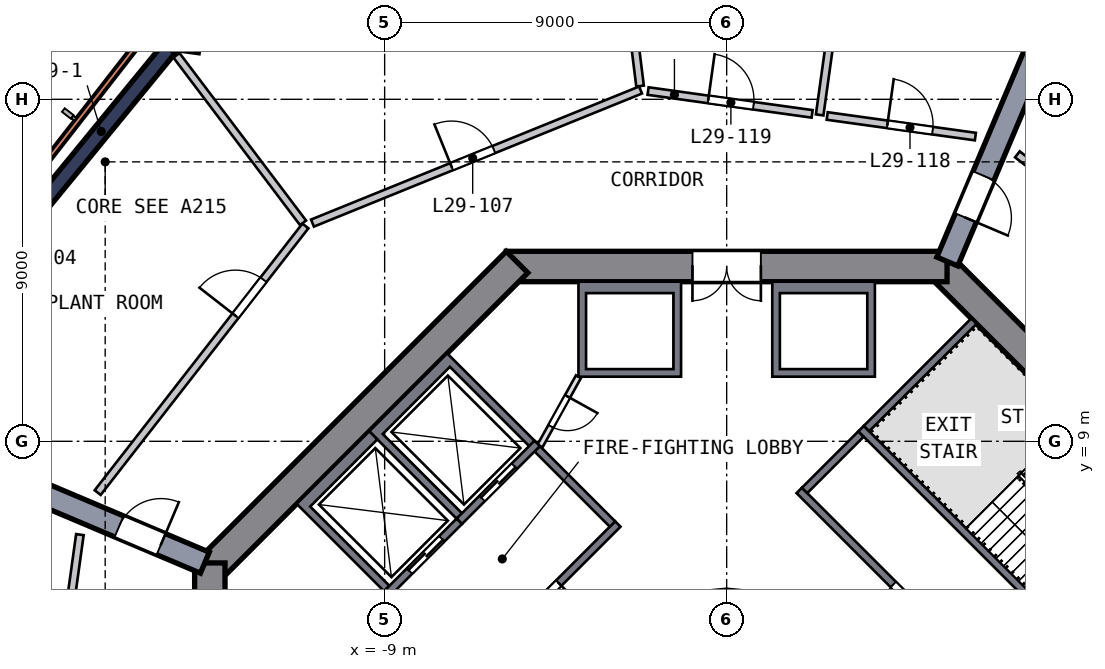
"""IFC4 building model, lengths in metres.
Left out: names, types, materials, properties, quantities, classifications, styles, units other than length and angle.
Written with IfcOpenShell. Run it as: python <this file> out.ifc"""

import sys

from ifc_helpers import new_model, si_unit, direction, frame, frame_2d, origin, origin_2d, place, context, subcontext, project, spatial, polyline, rectangle, outline, extrude, element, fill, save


model = new_model("IFC4")
c1 = context("Model", 3, precision=1e-05, world=origin(), true_north=direction((0.0, 1.0)))
c2 = subcontext(c1, "Body", "Model", "MODEL_VIEW")
j1 = project(units=[si_unit("LENGTHUNIT", "METRE"), si_unit("PLANEANGLEUNIT", "RADIAN")], contexts=[c1])
p1 = place(None, origin())
s1 = spatial("IfcSite", under=j1, at=p1, CompositionType="ELEMENT")
p2 = place(p1, origin())
s2 = spatial("IfcBuilding", under=s1, at=p2, CompositionType="ELEMENT")
p3 = place(p2, frame((0.0, 0.0, 122.0)))
s3 = spatial("IfcBuildingStorey", under=s2, at=p3, CompositionType="ELEMENT", Elevation=122.0)
p4 = place(p3, frame((-14.204, 19.906, 0.0), z_axis=(-0.0551557, -0.040054188, 0.99767405), x_axis=(0.135402045, 0.989664955, 0.047218248)))
e1 = element("IfcColumn", 1, at=p4, inside=s3, PredefinedType="COLUMN", context=c2, shape_type="SweptSolid", body=[
    extrude(rectangle(XDim=1.15, YDim=0.9, at=origin_2d()), origin(), (0.0, 0.0, 1.0), 4.51),
])
p5 = place(p3, frame((13.717, 5.516, 0.0), z_axis=(0.0, 0.0, 1.0), x_axis=(-0.707106781, 0.707106781, 0.0)))
e2 = element("IfcWall", 2, at=p5, inside=s3, PredefinedType="SHEAR", context=c2, shape_type="SweptSolid", body=[
    extrude(rectangle(XDim=11.598, YDim=0.8, at=frame_2d((5.799, 0.0))), origin(), (0.0, 0.0, 1.0), 6.0),
])
p6 = place(p5, frame((2.099, 0.0, 0.0)))
e3 = element("IfcOpeningElement", 3, at=p6, cuts=e2, PredefinedType="OPENING", context=c2, shape_type="SweptSolid", body=[
    extrude(rectangle(XDim=1.2, YDim=2.1, at=frame_2d((0.6, 1.05))), frame((0.0, 0.41, 0.0), z_axis=(0.0, -1.0, 0.0), x_axis=(1.0, 0.0, 0.0)), (0.0, 0.0, 1.0), 0.82),
])
p7 = place(p3, frame((5.799, 13.6, 0.0), z_axis=(0.0, 0.0, 1.0), x_axis=(-1.0, 0.0, 0.0)))
e4 = element("IfcWall", 4, at=p7, inside=s3, PredefinedType="SHEAR", context=c2, shape_type="SweptSolid", body=[
    extrude(rectangle(XDim=11.598, YDim=0.8, at=frame_2d((5.799, 0.0))), origin(), (0.0, 0.0, 1.0), 6.0),
])
p8 = place(p7, frame((4.899, 0.0, 0.0)))
e5 = element("IfcOpeningElement", 5, at=p8, cuts=e4, PredefinedType="OPENING", context=c2, shape_type="SweptSolid", body=[
    extrude(rectangle(XDim=1.8, YDim=2.1, at=frame_2d((0.9, 1.05))), frame((0.0, 0.41, 0.0), z_axis=(0.0, -1.0, 0.0), x_axis=(1.0, 0.0, 0.0)), (0.0, 0.0, 1.0), 0.82),
])
p9 = place(p3, frame((-5.516, 13.717, 0.0), z_axis=(0.0, 0.0, 1.0), x_axis=(-0.707106781, -0.707106781, 0.0)))
e6 = element("IfcWall", 6, at=p9, inside=s3, PredefinedType="SHEAR", context=c2, shape_type="SweptSolid", body=[
    extrude(rectangle(XDim=11.598, YDim=0.8, at=frame_2d((5.799, 0.0))), origin(), (0.0, 0.0, 1.0), 6.0),
])
p10 = place(p3, frame((-13.6, 5.799, 0.0), z_axis=(0.0, 0.0, 1.0), x_axis=(0.0, -1.0, 0.0)))
e7 = element("IfcWall", 7, at=p10, inside=s3, PredefinedType="SHEAR", context=c2, shape_type="SweptSolid", body=[
    extrude(rectangle(XDim=11.598, YDim=0.8, at=frame_2d((5.799, 0.0))), origin(), (0.0, 0.0, 1.0), 6.0),
])
p11 = place(p10, frame((4.899, 0.0, 0.0)))
e8 = element("IfcOpeningElement", 8, at=p11, cuts=e7, PredefinedType="OPENING", context=c2, shape_type="SweptSolid", body=[
    extrude(rectangle(XDim=1.8, YDim=2.1, at=frame_2d((0.9, 1.05))), frame((0.0, 0.41, 0.0), z_axis=(0.0, -1.0, 0.0), x_axis=(1.0, 0.0, 0.0)), (0.0, 0.0, 1.0), 0.82),
])
p12 = place(p3, frame((-14.664, 19.344, 0.0), z_axis=(0.0, 0.0, 1.0), x_axis=(-0.63358979, -0.773669166, 0.0)))
e9 = element("IfcWall", 9, at=p12, inside=s3, PredefinedType="SHEAR", context=c2, shape_type="SweptSolid", body=[
    extrude(rectangle(XDim=5.664, YDim=0.4, at=frame_2d((2.832, 0.0))), origin(), (0.0, 0.0, 1.0), 4.5),
])
p13 = place(p3, frame((-13.731, 5.806, 0.0), z_axis=(0.0, 0.0, 1.0), x_axis=(-0.921048088, 0.389448866, 0.0)))
e10 = element("IfcWall", 10, at=p13, inside=s3, PredefinedType="SHEAR", context=c2, shape_type="SweptSolid", body=[
    extrude(rectangle(XDim=8.835, YDim=0.6, at=frame_2d((4.417, 0.0))), origin(), (0.0, 0.0, 1.0), 4.5),
])
p14 = place(p13, frame((1.25, 0.0, 0.0)))
e11 = element("IfcOpeningElement", 11, at=p14, cuts=e10, PredefinedType="OPENING", context=c2, shape_type="SweptSolid", body=[
    extrude(rectangle(XDim=1.2, YDim=2.1, at=frame_2d((0.6, 1.05))), frame((0.0, 0.31, 0.0), z_axis=(0.0, -1.0, 0.0), x_axis=(1.0, 0.0, 0.0)), (0.0, 0.0, 1.0), 0.62),
])
p15 = place(p3, frame((5.806, 13.731, 0.0), z_axis=(0.0, 0.0, 1.0), x_axis=(0.389448866, 0.921048088, 0.0)))
e12 = element("IfcWall", 12, at=p15, inside=s3, PredefinedType="SHEAR", context=c2, shape_type="SweptSolid", body=[
    extrude(rectangle(XDim=8.835, YDim=0.6, at=frame_2d((4.417, 0.0))), origin(), (0.0, 0.0, 1.0), 4.5),
])
p16 = place(p15, frame((1.25, 0.0, 0.0)))
e13 = element("IfcOpeningElement", 13, at=p16, cuts=e12, PredefinedType="OPENING", context=c2, shape_type="SweptSolid", body=[
    extrude(rectangle(XDim=1.2, YDim=2.1, at=frame_2d((0.6, 1.05))), frame((0.0, 0.31, 0.0), z_axis=(0.0, -1.0, 0.0), x_axis=(1.0, 0.0, 0.0)), (0.0, 0.0, 1.0), 0.62),
])
p17 = place(p3, frame((-15.076, 19.999, 0.0), z_axis=(0.0, 0.0, 1.0), x_axis=(-0.614558391, -0.788871336, 0.0)))
e14 = element("IfcWall", 14, at=p17, inside=s3, PredefinedType="SOLIDWALL", context=c2, shape_type="SweptSolid", body=[
    extrude(rectangle(XDim=13.046, YDim=0.15, at=frame_2d((6.523, 0.0))), origin(), (0.0, 0.0, 1.0), 4.5),
])
p18 = place(p3, origin())
e15 = element("IfcWall", 15, at=p18, inside=s3, PredefinedType="SOLIDWALL", context=c2, shape_type="SweptSolid", body=[
    extrude(outline(polyline([(1.2, 13.2), (3.9, 13.2), (3.9, 10.7), (1.2, 10.7), (1.2, 13.2)]), holes=[polyline([(3.7, 10.9), (3.7, 12.9), (1.4, 12.9), (1.4, 10.9), (3.7, 10.9)])]), origin(), (0.0, 0.0, 1.0), 5.55),
])
p19 = place(p3, origin())
e16 = element("IfcWall", 16, at=p19, inside=s3, PredefinedType="SOLIDWALL", context=c2, shape_type="SweptSolid", body=[
    extrude(outline(polyline([(-3.9, 10.7), (-3.9, 13.2), (-1.2, 13.2), (-1.2, 10.7), (-3.9, 10.7)]), holes=[polyline([(-1.4, 12.9), (-3.7, 12.9), (-3.7, 10.9), (-1.4, 10.9), (-1.4, 12.9)])]), origin(), (0.0, 0.0, 1.0), 5.55),
])
p20 = place(p3, origin())
e17 = element("IfcWall", 17, at=p20, inside=s3, PredefinedType="SOLIDWALL", context=c2, shape_type="SweptSolid", body=[
    extrude(outline(polyline([(-9.405, 9.263), (-7.354, 11.314), (-5.056, 9.016), (-5.197, 8.874), (-7.283, 10.96), (-9.051, 9.192), (-6.965, 7.106), (-7.106, 6.965), (-9.405, 9.263)])), origin(), (0.0, 0.0, 1.0), 5.55),
])
p21 = place(p3, frame((-4.985, 8.945, 0.0), z_axis=(0.0, 0.0, 1.0), x_axis=(-0.707106781, -0.707106781, 0.0)))
e18 = element("IfcWall", 18, at=p21, inside=s3, PredefinedType="SOLIDWALL", context=c2, shape_type="SweptSolid", body=[
    extrude(rectangle(XDim=2.9, YDim=0.2, at=frame_2d((1.45, 0.0))), origin(), (0.0, 0.0, 1.0), 5.55),
])
p22 = place(p21, frame((0.85, 0.0, 0.0)))
e19 = element("IfcOpeningElement", 19, at=p22, cuts=e18, PredefinedType="OPENING", context=c2, shape_type="SweptSolid", body=[
    extrude(rectangle(XDim=1.2, YDim=2.1, at=frame_2d((0.6, 1.05))), frame((0.0, 0.11, 0.0), z_axis=(0.0, -1.0, 0.0), x_axis=(1.0, 0.0, 0.0)), (0.0, 0.0, 1.0), 0.22),
])
p23 = place(p3, origin())
e20 = element("IfcWall", 20, at=p23, inside=s3, PredefinedType="SOLIDWALL", context=c2, shape_type="SweptSolid", body=[
    extrude(outline(polyline([(-11.314, 7.354), (-9.405, 9.263), (-9.192, 9.051), (-10.96, 7.283), (-8.874, 5.197), (-9.016, 5.056), (-11.314, 7.354)])), origin(), (0.0, 0.0, 1.0), 5.55),
])
p24 = place(p3, frame((-7.036, 6.894, 0.0), z_axis=(0.0, 0.0, 1.0), x_axis=(-0.707106781, -0.707106781, 0.0)))
e21 = element("IfcWall", 21, at=p24, inside=s3, PredefinedType="SOLIDWALL", context=c2, shape_type="SweptSolid", body=[
    extrude(rectangle(XDim=2.7, YDim=0.2, at=frame_2d((1.35, 0.0))), origin(), (0.0, 0.0, 1.0), 5.55),
])
p25 = place(p24, frame((0.65, 0.0, 0.0)))
e22 = element("IfcOpeningElement", 22, at=p25, cuts=e21, PredefinedType="OPENING", context=c2, shape_type="SweptSolid", body=[
    extrude(rectangle(XDim=1.2, YDim=2.1, at=frame_2d((0.6, 1.05))), frame((0.0, 0.11, 0.0), z_axis=(0.0, -1.0, 0.0), x_axis=(1.0, 0.0, 0.0)), (0.0, 0.0, 1.0), 0.22),
])
p26 = place(p3, frame((3.535, 9.334, 0.0), z_axis=(0.0, 0.0, 1.0), x_axis=(0.707106781, -0.707106781, 0.0)))
e23 = element("IfcWall", 23, at=p26, inside=s3, PredefinedType="SOLIDWALL", context=c2, shape_type="SweptSolid", body=[
    extrude(rectangle(XDim=8.2, YDim=0.2, at=frame_2d((4.1, 0.0))), origin(), (0.0, 0.0, 1.0), 5.55),
])
p27 = place(p26, frame((6.6, 0.0, 0.0)))
e24 = element("IfcOpeningElement", 24, at=p27, cuts=e23, PredefinedType="OPENING", context=c2, shape_type="SweptSolid", body=[
    extrude(rectangle(XDim=1.2, YDim=2.1, at=frame_2d((0.6, 1.05))), frame((0.0, 0.11, 0.0), z_axis=(0.0, -1.0, 0.0), x_axis=(1.0, 0.0, 0.0)), (0.0, 0.0, 1.0), 0.22),
])
p28 = place(p3, frame((3.677, 9.334, 0.0), z_axis=(0.0, 0.0, 1.0), x_axis=(0.707106781, 0.707106781, 0.0)))
e25 = element("IfcWall", 25, at=p28, inside=s3, PredefinedType="SOLIDWALL", context=c2, shape_type="SweptSolid", body=[
    extrude(rectangle(XDim=4.0, YDim=0.2, at=frame_2d((2.0, 0.0))), origin(), (0.0, 0.0, 1.0), 5.55),
])
p29 = place(p3, frame((-2.864, 6.823, 0.0), z_axis=(0.0, 0.0, 1.0), x_axis=(-0.707106781, -0.707106781, 0.0)))
e26 = element("IfcWall", 26, at=p29, inside=s3, PredefinedType="SOLIDWALL", context=c2, shape_type="SweptSolid", body=[
    extrude(rectangle(XDim=5.6, YDim=0.2, at=frame_2d((2.8, 0.0))), origin(), (0.0, 0.0, 1.0), 5.55),
])
p30 = place(p29, frame((2.2, 0.0, 0.0)))
e27 = element("IfcOpeningElement", 27, at=p30, cuts=e26, PredefinedType="OPENING", context=c2, shape_type="SweptSolid", body=[
    extrude(rectangle(XDim=1.2, YDim=2.1, at=frame_2d((0.6, 1.05))), frame((0.0, 0.11, 0.0), z_axis=(0.0, -1.0, 0.0), x_axis=(1.0, 0.0, 0.0)), (0.0, 0.0, 1.0), 0.22),
])
p31 = place(p3, frame((-3.005, 6.823, 0.0), z_axis=(0.0, 0.0, 1.0), x_axis=(-0.707106781, 0.707106781, 0.0)))
e28 = element("IfcWall", 28, at=p31, inside=s3, PredefinedType="SOLIDWALL", context=c2, shape_type="SweptSolid", body=[
    extrude(rectangle(XDim=2.8, YDim=0.2, at=frame_2d((1.4, 0.0))), origin(), (0.0, 0.0, 1.0), 5.55),
])
p32 = place(p3, frame((-3.9, 10.7, 0.0), z_axis=(0.0, 0.0, 1.0), x_axis=(-0.485692555, -0.874129705, 0.0)))
e29 = element("IfcWall", 29, at=p32, inside=s3, PredefinedType="PARTITIONING", context=c2, shape_type="SweptSolid", body=[
    extrude(rectangle(XDim=2.089, YDim=0.15, at=frame_2d((1.044, 0.0))), origin(), (0.0, 0.0, 1.0), 5.55),
])
p33 = place(p32, frame((0.594, 0.0, 0.0)))
e30 = element("IfcOpeningElement", 30, at=p33, cuts=e29, PredefinedType="OPENING", context=c2, shape_type="SweptSolid", body=[
    extrude(rectangle(XDim=0.9, YDim=2.1, at=frame_2d((0.45, 1.05))), frame((0.0, 0.085, 0.0), z_axis=(0.0, -1.0, 0.0), x_axis=(1.0, 0.0, 0.0)), (0.0, 0.0, 1.0), 0.17),
])
p34 = place(p3, frame((7.708, 1.909, 0.0), z_axis=(0.0, 0.0, 1.0), x_axis=(-0.707106781, 0.707106781, 0.0)))
e31 = element("IfcWall", 31, at=p34, inside=s3, PredefinedType="SOLIDWALL", context=c2, shape_type="SweptSolid", body=[
    extrude(rectangle(XDim=8.2, YDim=0.2, at=frame_2d((4.1, 0.0))), origin(), (0.0, 0.0, 1.0), 5.55),
])
p35 = place(p34, frame((3.5, 0.0, 0.0)))
e32 = element("IfcOpeningElement", 32, at=p35, cuts=e31, PredefinedType="OPENING", context=c2, shape_type="SweptSolid", body=[
    extrude(rectangle(XDim=1.2, YDim=2.1, at=frame_2d((0.6, 1.05))), frame((0.0, 0.11, 0.0), z_axis=(0.0, -1.0, 0.0), x_axis=(1.0, 0.0, 0.0)), (0.0, 0.0, 1.0), 0.22),
])
p36 = place(p3, frame((2.051, 7.708, 0.0), z_axis=(0.0, 0.0, 1.0), x_axis=(0.707106781, 0.707106781, 0.0)))
e33 = element("IfcWall", 33, at=p36, inside=s3, PredefinedType="SOLIDWALL", context=c2, shape_type="SweptSolid", body=[
    extrude(rectangle(XDim=2.1, YDim=0.2, at=frame_2d((1.05, 0.0))), origin(), (0.0, 0.0, 1.0), 5.55),
])
p37 = place(p3, origin())
e34 = element("IfcWall", 34, at=p37, inside=s3, PredefinedType="SOLIDWALL", context=c2, shape_type="SweptSolid", body=[
    extrude(outline(polyline([(5.021, -0.999), (4.73, -1.959), (4.257, -2.844), (3.62, -3.62), (2.844, -4.257), (1.959, -4.73), (0.999, -5.021), (0.0, -5.12), (-0.999, -5.021), (-1.959, -4.73), (-2.844, -4.257), (-3.62, -3.62), (-4.257, -2.844), (-4.73, -1.959), (-5.021, -0.999), (-5.12, 0.0), (-5.021, 0.999), (-4.73, 1.959), (-4.257, 2.844), (-3.62, 3.62), (-2.844, 4.257), (-1.959, 4.73), (-0.999, 5.021), (0.0, 5.12), (0.999, 5.021), (1.959, 4.73), (2.844, 4.257), (3.62, 3.62), (4.257, 2.844), (4.73, 1.959), (5.021, 0.999), (5.12, 0.0), (5.021, -0.999)]), holes=[polyline([(4.904, 0.976), (4.619, 1.913), (4.157, 2.778), (3.535, 3.535), (2.778, 4.157), (1.913, 4.619), (0.976, 4.904), (0.0, 5.0), (-0.976, 4.904), (-1.913, 4.619), (-2.778, 4.157), (-3.535, 3.535), (-4.157, 2.778), (-4.619, 1.913), (-4.904, 0.976), (-5.0, 0.0), (-4.904, -0.976), (-4.619, -1.913), (-4.157, -2.778), (-3.535, -3.535), (-2.778, -4.157), (-1.913, -4.619), (-0.976, -4.904), (0.0, -5.0), (0.976, -4.904), (1.913, -4.619), (2.778, -4.157), (3.535, -3.535), (4.157, -2.778), (4.619, -1.913), (4.904, -0.976), (5.0, 0.0), (4.904, 0.976)])]), origin(), (0.0, 0.0, 1.0), 5.55),
])
p38 = place(p3, frame((-17.019, 6.544, 0.0), z_axis=(0.0, 0.0, 1.0), x_axis=(-0.137739068, -0.99046855, 0.0)))
e35 = element("IfcWall", 35, at=p38, inside=s3, PredefinedType="SOLIDWALL", context=c2, shape_type="SweptSolid", body=[
    extrude(rectangle(XDim=3.937, YDim=0.2, at=frame_2d((1.968, 0.0))), origin(), (0.0, 0.0, 1.0), 4.5),
])
p39 = place(p3, frame((-16.551, 7.65, 0.0), z_axis=(0.0, 0.0, 1.0), x_axis=(0.614571282, 0.788861293, 0.0)))
e36 = element("IfcWall", 36, at=p39, inside=s3, PredefinedType="SOLIDWALL", context=c2, shape_type="SweptSolid", body=[
    extrude(rectangle(XDim=8.895, YDim=0.2, at=frame_2d((4.448, 0.0))), origin(), (0.0, 0.0, 1.0), 4.5),
])
p40 = place(p39, frame((5.9, 0.0, 0.0)))
e37 = element("IfcOpeningElement", 37, at=p40, cuts=e36, PredefinedType="OPENING", context=c2, shape_type="SweptSolid", body=[
    extrude(rectangle(XDim=1.2, YDim=2.1, at=frame_2d((0.6, 1.05))), frame((0.0, 0.11, 0.0), z_axis=(0.0, -1.0, 0.0), x_axis=(1.0, 0.0, 0.0)), (0.0, 0.0, 1.0), 0.22),
])
p41 = place(p3, frame((-11.147, 14.75, 0.0), z_axis=(0.0, 0.0, 1.0), x_axis=(-0.602936843, 0.797788922, 0.0)))
e38 = element("IfcWall", 38, at=p41, inside=s3, PredefinedType="SOLIDWALL", context=c2, shape_type="SweptSolid", body=[
    extrude(rectangle(XDim=5.526, YDim=0.2, at=frame_2d((2.763, 0.0))), origin(), (0.0, 0.0, 1.0), 4.5),
])
p42 = place(p3, frame((-10.899, 14.742, 0.0), z_axis=(0.0, 0.0, 1.0), x_axis=(0.926656636, 0.37590887, 0.0)))
e39 = element("IfcWall", 39, at=p42, inside=s3, PredefinedType="SOLIDWALL", context=c2, shape_type="SweptSolid", body=[
    extrude(rectangle(XDim=9.317, YDim=0.2, at=frame_2d((4.658, 0.0))), origin(), (0.0, 0.0, 1.0), 4.5),
])
p43 = place(p42, frame((3.95, 0.0, 0.0)))
e40 = element("IfcOpeningElement", 40, at=p43, cuts=e39, PredefinedType="OPENING", context=c2, shape_type="SweptSolid", body=[
    extrude(rectangle(XDim=1.2, YDim=2.1, at=frame_2d((0.6, 1.05))), frame((0.0, 0.11, 0.0), z_axis=(0.0, -1.0, 0.0), x_axis=(1.0, 0.0, 0.0)), (0.0, 0.0, 1.0), 0.22),
])
p44 = place(p3, frame((-3.077, 24.774, 0.0), z_axis=(0.0, 0.0, 1.0), x_axis=(0.123245866, -0.992376167, 0.0)))
e41 = element("IfcWall", 41, at=p44, inside=s3, PredefinedType="SOLIDWALL", context=c2, shape_type="SweptSolid", body=[
    extrude(rectangle(XDim=6.476, YDim=0.2, at=frame_2d((3.238, 0.0))), origin(), (0.0, 0.0, 1.0), 4.5),
])
p45 = place(p3, frame((-2.068, 18.217, 0.0), z_axis=(0.0, 0.0, 1.0), x_axis=(0.99045938, -0.137804993, 0.0)))
e42 = element("IfcWall", 42, at=p45, inside=s3, PredefinedType="SOLIDWALL", context=c2, shape_type="SweptSolid", body=[
    extrude(rectangle(XDim=4.358, YDim=0.2, at=frame_2d((2.179, 0.0))), origin(), (0.0, 0.0, 1.0), 4.5),
])
p46 = place(p45, frame((1.6, 0.0, 0.0)))
e43 = element("IfcOpeningElement", 43, at=p46, cuts=e42, PredefinedType="OPENING", context=c2, shape_type="SweptSolid", body=[
    extrude(rectangle(XDim=1.2, YDim=2.1, at=frame_2d((0.6, 1.05))), frame((0.0, 0.11, 0.0), z_axis=(0.0, -1.0, 0.0), x_axis=(1.0, 0.0, 0.0)), (0.0, 0.0, 1.0), 0.22),
])
p47 = place(p3, frame((2.447, 17.589, 0.0), z_axis=(0.0, 0.0, 1.0), x_axis=(0.137797833, 0.990460376, 0.0)))
e44 = element("IfcWall", 44, at=p47, inside=s3, PredefinedType="SOLIDWALL", context=c2, shape_type="SweptSolid", body=[
    extrude(rectangle(XDim=6.35, YDim=0.2, at=frame_2d((3.175, 0.0))), origin(), (0.0, 0.0, 1.0), 4.5),
])
p48 = place(p3, frame((2.645, 17.561, 0.0), z_axis=(0.0, 0.0, 1.0), x_axis=(0.990462443, -0.137782981, 0.0)))
e45 = element("IfcWall", 45, at=p48, inside=s3, PredefinedType="SOLIDWALL", context=c2, shape_type="SweptSolid", body=[
    extrude(rectangle(XDim=3.937, YDim=0.2, at=frame_2d((1.969, 0.0))), origin(), (0.0, 0.0, 1.0), 4.5),
])
p49 = place(p48, frame((1.6, 0.0, 0.0)))
e46 = element("IfcOpeningElement", 46, at=p49, cuts=e45, PredefinedType="OPENING", context=c2, shape_type="SweptSolid", body=[
    extrude(rectangle(XDim=1.2, YDim=2.1, at=frame_2d((0.6, 1.05))), frame((0.0, 0.11, 0.0), z_axis=(0.0, -1.0, 0.0), x_axis=(1.0, 0.0, 0.0)), (0.0, 0.0, 1.0), 0.22),
])
p50 = place(p3, frame((7.65, 16.552, 0.0), z_axis=(0.0, 0.0, 1.0), x_axis=(0.788857495, -0.614576157, 0.0)))
e47 = element("IfcWall", 47, at=p50, inside=s3, PredefinedType="SOLIDWALL", context=c2, shape_type="SweptSolid", body=[
    extrude(rectangle(XDim=7.524, YDim=0.2, at=frame_2d((3.762, 0.0))), origin(), (0.0, 0.0, 1.0), 4.5),
])
p51 = place(p50, frame((5.9, 0.0, 0.0)))
e48 = element("IfcOpeningElement", 48, at=p51, cuts=e47, PredefinedType="OPENING", context=c2, shape_type="SweptSolid", body=[
    extrude(rectangle(XDim=1.2, YDim=2.1, at=frame_2d((0.6, 1.05))), frame((0.0, 0.11, 0.0), z_axis=(0.0, -1.0, 0.0), x_axis=(1.0, 0.0, 0.0)), (0.0, 0.0, 1.0), 0.22),
])
p52 = place(p22, origin())
e49 = element("IfcDoor", 49, at=p52, inside=s3, OperationType="DOUBLE_DOOR_SLIDING", PredefinedType="DOOR", context=c2, shape_type="SweptSolid", body=[
    extrude(rectangle(XDim=1.2, YDim=2.1, at=frame_2d((0.6, 1.05))), frame((0.0, 0.025, 0.0), z_axis=(0.0, -1.0, 0.0), x_axis=(1.0, 0.0, 0.0)), (0.0, 0.0, 1.0), 0.05),
])
fill(e19, e49)
p53 = place(p25, origin())
e50 = element("IfcDoor", 50, at=p53, inside=s3, OperationType="DOUBLE_DOOR_SLIDING", PredefinedType="DOOR", context=c2, shape_type="SweptSolid", body=[
    extrude(rectangle(XDim=1.2, YDim=2.1, at=frame_2d((0.6, 1.05))), frame((0.0, 0.025, 0.0), z_axis=(0.0, -1.0, 0.0), x_axis=(1.0, 0.0, 0.0)), (0.0, 0.0, 1.0), 0.05),
])
fill(e22, e50)
p54 = place(p8, origin())
e51 = element("IfcDoor", 51, at=p54, inside=s3, OperationType="DOUBLE_DOOR_SINGLE_SWING", PredefinedType="DOOR", context=c2, shape_type="SweptSolid", body=[
    extrude(rectangle(XDim=1.8, YDim=2.1, at=frame_2d((0.9, 1.05))), frame((0.0, 0.025, 0.0), z_axis=(0.0, -1.0, 0.0), x_axis=(1.0, 0.0, 0.0)), (0.0, 0.0, 1.0), 0.05),
])
fill(e5, e51)
p55 = place(p30, origin())
e52 = element("IfcDoor", 52, at=p55, inside=s3, OperationType="SINGLE_SWING_LEFT", PredefinedType="DOOR", context=c2, shape_type="SweptSolid", body=[
    extrude(rectangle(XDim=1.2, YDim=2.1, at=frame_2d((0.6, 1.05))), frame((0.0, 0.025, 0.0), z_axis=(0.0, -1.0, 0.0), x_axis=(1.0, 0.0, 0.0)), (0.0, 0.0, 1.0), 0.05),
])
fill(e27, e52)
p56 = place(p33, origin())
e53 = element("IfcDoor", 53, at=p56, inside=s3, OperationType="SINGLE_SWING_LEFT", PredefinedType="DOOR", context=c2, shape_type="SweptSolid", body=[
    extrude(rectangle(XDim=0.9, YDim=2.1, at=frame_2d((0.45, 1.05))), frame((0.0, 0.025, 0.0), z_axis=(0.0, -1.0, 0.0), x_axis=(1.0, 0.0, 0.0)), (0.0, 0.0, 1.0), 0.05),
])
fill(e30, e53)
p57 = place(p35, origin())
e54 = element("IfcDoor", 54, at=p57, inside=s3, OperationType="SINGLE_SWING_LEFT", PredefinedType="DOOR", context=c2, shape_type="SweptSolid", body=[
    extrude(rectangle(XDim=1.2, YDim=2.1, at=frame_2d((0.6, 1.05))), frame((0.0, 0.025, 0.0), z_axis=(0.0, -1.0, 0.0), x_axis=(1.0, 0.0, 0.0)), (0.0, 0.0, 1.0), 0.05),
])
fill(e32, e54)
p58 = place(p14, origin())
e55 = element("IfcDoor", 55, at=p58, inside=s3, OperationType="SINGLE_SWING_LEFT", PredefinedType="DOOR", context=c2, shape_type="SweptSolid", body=[
    extrude(rectangle(XDim=1.2, YDim=2.1, at=frame_2d((0.6, 1.05))), frame((0.0, 0.025, 0.0), z_axis=(0.0, -1.0, 0.0), x_axis=(1.0, 0.0, 0.0)), (0.0, 0.0, 1.0), 0.05),
])
fill(e11, e55)
p59 = place(p16, origin())
e56 = element("IfcDoor", 56, at=p59, inside=s3, OperationType="SINGLE_SWING_LEFT", PredefinedType="DOOR", context=c2, shape_type="SweptSolid", body=[
    extrude(rectangle(XDim=1.2, YDim=2.1, at=frame_2d((0.6, 1.05))), frame((0.0, 0.025, 0.0), z_axis=(0.0, -1.0, 0.0), x_axis=(1.0, 0.0, 0.0)), (0.0, 0.0, 1.0), 0.05),
])
fill(e13, e56)
p60 = place(p43, origin())
e57 = element("IfcDoor", 57, at=p60, inside=s3, OperationType="SINGLE_SWING_LEFT", PredefinedType="DOOR", context=c2, shape_type="SweptSolid", body=[
    extrude(rectangle(XDim=1.2, YDim=2.1, at=frame_2d((0.6, 1.05))), frame((0.0, 0.025, 0.0), z_axis=(0.0, -1.0, 0.0), x_axis=(1.0, 0.0, 0.0)), (0.0, 0.0, 1.0), 0.05),
])
fill(e40, e57)
p61 = place(p40, origin())
e58 = element("IfcDoor", 58, at=p61, inside=s3, OperationType="SINGLE_SWING_LEFT", PredefinedType="DOOR", context=c2, shape_type="SweptSolid", body=[
    extrude(rectangle(XDim=1.2, YDim=2.1, at=frame_2d((0.6, 1.05))), frame((0.0, 0.025, 0.0), z_axis=(0.0, -1.0, 0.0), x_axis=(1.0, 0.0, 0.0)), (0.0, 0.0, 1.0), 0.05),
])
fill(e37, e58)
p62 = place(p49, origin())
e59 = element("IfcDoor", 59, at=p62, inside=s3, OperationType="SINGLE_SWING_LEFT", PredefinedType="DOOR", context=c2, shape_type="SweptSolid", body=[
    extrude(rectangle(XDim=1.2, YDim=2.1, at=frame_2d((0.6, 1.05))), frame((0.0, 0.025, 0.0), z_axis=(0.0, -1.0, 0.0), x_axis=(1.0, 0.0, 0.0)), (0.0, 0.0, 1.0), 0.05),
])
fill(e46, e59)
p63 = place(p46, origin())
e60 = element("IfcDoor", 60, at=p63, inside=s3, OperationType="SINGLE_SWING_LEFT", PredefinedType="DOOR", context=c2, shape_type="SweptSolid", body=[
    extrude(rectangle(XDim=1.2, YDim=2.1, at=frame_2d((0.6, 1.05))), frame((0.0, 0.025, 0.0), z_axis=(0.0, -1.0, 0.0), x_axis=(1.0, 0.0, 0.0)), (0.0, 0.0, 1.0), 0.05),
])
fill(e43, e60)
save(model, sys.argv[1])
